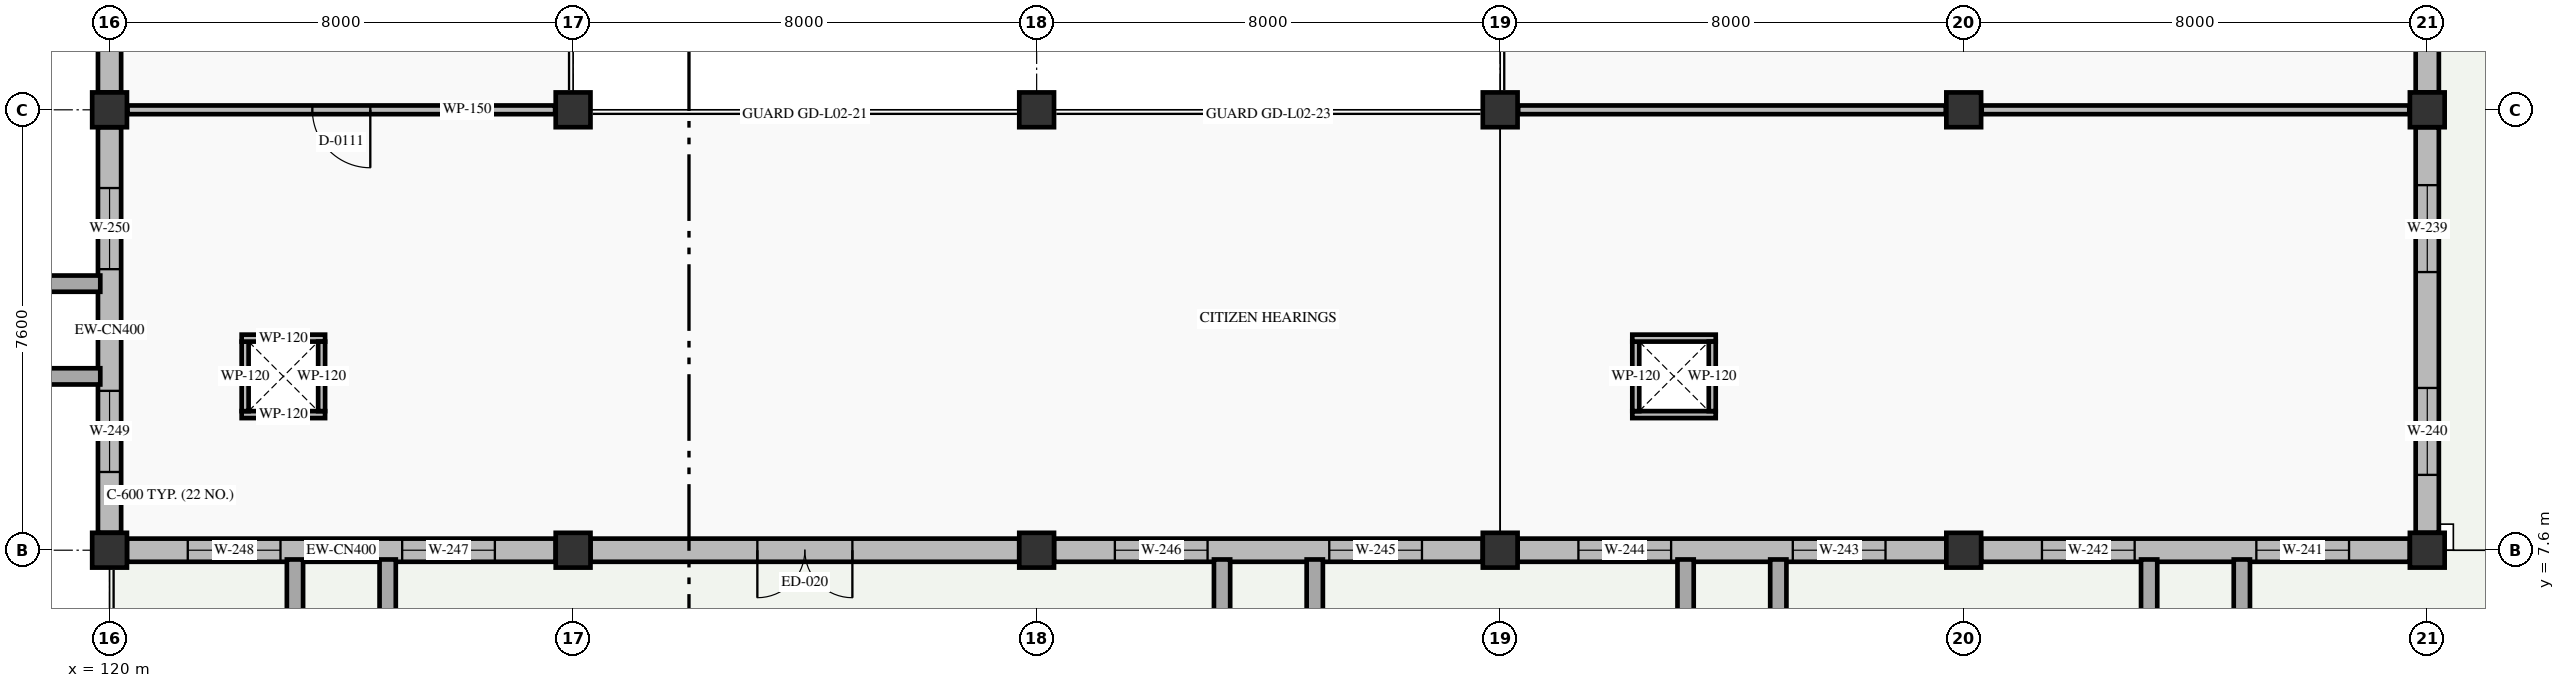
"""IFC4 building model, lengths in metres.
Left out: names, types, materials, properties, quantities, classifications, styles, units other than length and angle.
Written with IfcOpenShell. Run it as: python <this file> out.ifc"""

import sys

from ifc_helpers import new_model, si_unit, direction, frame, frame_2d, origin, origin_2d, place, context, subcontext, project, spatial, rectangle, extrude, element, fill, save


model = new_model("IFC4")
c1 = context("Model", 3, precision=1e-05, world=origin(), true_north=direction((0.0, 1.0)))
c2 = subcontext(c1, "Body", "Model", "MODEL_VIEW")
j1 = project(units=[si_unit("LENGTHUNIT", "METRE"), si_unit("PLANEANGLEUNIT", "RADIAN")], contexts=[c1])
p1 = place(None, origin())
s1 = spatial("IfcSite", under=j1, at=p1, CompositionType="ELEMENT")
p2 = place(p1, origin())
s2 = spatial("IfcBuilding", under=s1, at=p2, CompositionType="ELEMENT")
p3 = place(p2, frame((0.0, 0.0, 5.4)))
s3 = spatial("IfcBuildingStorey", under=s2, at=p3, CompositionType="ELEMENT", Elevation=5.4)
for number, where, z_axis, x_axis in (
    (1, (120.0, 7.6, 0.0), (0.0, 0.0, 1.0), (1.0, 0.0, 0.0)),
    (2, (120.0, 15.2, 0.0), (0.0, 0.0, 1.0), (1.0, 0.0, 0.0)),
    (3, (128.0, 7.6, 0.0), (0.0, 0.0, 1.0), (1.0, 0.0, 0.0)),
    (4, (128.0, 15.2, 0.0), (0.0, 0.0, 1.0), (1.0, 0.0, 0.0)),
    (5, (136.0, 7.6, 0.0), (0.0, 0.0, 1.0), (1.0, 0.0, 0.0)),
    (6, (136.0, 15.2, 0.0), (0.0, 0.0, 1.0), (1.0, 0.0, 0.0)),
    (7, (144.0, 7.6, 0.0), (0.0, 0.0, 1.0), (1.0, 0.0, 0.0)),
    (8, (144.0, 15.2, 0.0), (0.0, 0.0, 1.0), (1.0, 0.0, 0.0)),
    (9, (152.0, 7.6, 0.0), (0.0, 0.0, 1.0), (1.0, 0.0, 0.0)),
    (10, (152.0, 15.2, 0.0), (0.0, 0.0, 1.0), (1.0, 0.0, 0.0)),
    (11, (160.0, 7.6, 0.0), (0.0, 0.0, 1.0), (1.0, 0.0, 0.0)),
    (12, (160.0, 15.2, 0.0), (0.0, 0.0, 1.0), (1.0, 0.0, 0.0)),
):
    element("IfcColumn", number, at=place(p3, frame(where, z_axis=z_axis, x_axis=x_axis)), inside=s3, PredefinedType="COLUMN", context=c2, shape_type="SweptSolid", body=[
        extrude(rectangle(XDim=0.6, YDim=0.6, at=origin_2d()), origin(), (0.0, 0.0, 1.0), 4.8),
    ])
p4 = place(p3, frame((160.0, 18.7, 0.0), z_axis=(0.0, 0.0, 1.0), x_axis=(0.0, -1.0, 0.0)))
e13 = element("IfcWall", 13, at=p4, inside=s3, PredefinedType="STANDARD", context=c2, shape_type="SweptSolid", body=[
    extrude(rectangle(XDim=3.2, YDim=0.4, at=frame_2d((1.6, 0.0))), origin(), (0.0, 0.0, 1.0), 3.85),
])
p5 = place(p4, frame((0.85, 0.0, 0.9)))
e14 = element("IfcOpeningElement", 14, at=p5, cuts=e13, PredefinedType="OPENING", context=c2, shape_type="SweptSolid", body=[
    extrude(rectangle(XDim=1.5, YDim=2.15, at=frame_2d((0.75, 1.075))), frame((0.0, 0.21, 0.0), z_axis=(0.0, -1.0, 0.0), x_axis=(1.0, 0.0, 0.0)), (0.0, 0.0, 1.0), 0.42),
])
p6 = place(p3, frame((160.0, 14.9, 0.0), z_axis=(0.0, 0.0, 1.0), x_axis=(0.0, -1.0, 0.0)))
e15 = element("IfcWall", 15, at=p6, inside=s3, PredefinedType="STANDARD", context=c2, shape_type="SweptSolid", body=[
    extrude(rectangle(XDim=7.0, YDim=0.4, at=frame_2d((3.5, 0.0))), origin(), (0.0, 0.0, 1.0), 3.85),
])
p7 = place(p6, frame((1.0, 0.0, 0.9)))
e16 = element("IfcOpeningElement", 16, at=p7, cuts=e15, PredefinedType="OPENING", context=c2, shape_type="SweptSolid", body=[
    extrude(rectangle(XDim=1.5, YDim=2.15, at=frame_2d((0.75, 1.075))), frame((0.0, 0.21, 0.0), z_axis=(0.0, -1.0, 0.0), x_axis=(1.0, 0.0, 0.0)), (0.0, 0.0, 1.0), 0.42),
])
p8 = place(p6, frame((4.5, 0.0, 0.9)))
e17 = element("IfcOpeningElement", 17, at=p8, cuts=e15, PredefinedType="OPENING", context=c2, shape_type="SweptSolid", body=[
    extrude(rectangle(XDim=1.5, YDim=2.15, at=frame_2d((0.75, 1.075))), frame((0.0, 0.21, 0.0), z_axis=(0.0, -1.0, 0.0), x_axis=(1.0, 0.0, 0.0)), (0.0, 0.0, 1.0), 0.42),
])
p9 = place(p3, frame((159.7, 7.6, 0.0), z_axis=(0.0, 0.0, 1.0), x_axis=(-1.0, 0.0, 0.0)))
e18 = element("IfcWall", 18, at=p9, inside=s3, PredefinedType="STANDARD", context=c2, shape_type="SweptSolid", body=[
    extrude(rectangle(XDim=7.4, YDim=0.4, at=frame_2d((3.7, 0.0))), origin(), (0.0, 0.0, 1.0), 3.85),
])
p10 = place(p9, frame((1.05, 0.0, 0.9)))
e19 = element("IfcOpeningElement", 19, at=p10, cuts=e18, PredefinedType="OPENING", context=c2, shape_type="SweptSolid", body=[
    extrude(rectangle(XDim=1.6, YDim=2.25, at=frame_2d((0.8, 1.125))), frame((0.0, 0.21, 0.0), z_axis=(0.0, -1.0, 0.0), x_axis=(1.0, 0.0, 0.0)), (0.0, 0.0, 1.0), 0.42),
])
p11 = place(p9, frame((4.75, 0.0, 0.9)))
e20 = element("IfcOpeningElement", 20, at=p11, cuts=e18, PredefinedType="OPENING", context=c2, shape_type="SweptSolid", body=[
    extrude(rectangle(XDim=1.6, YDim=2.25, at=frame_2d((0.8, 1.125))), frame((0.0, 0.21, 0.0), z_axis=(0.0, -1.0, 0.0), x_axis=(1.0, 0.0, 0.0)), (0.0, 0.0, 1.0), 0.42),
])
p12 = place(p3, frame((151.7, 7.6, 0.0), z_axis=(0.0, 0.0, 1.0), x_axis=(-1.0, 0.0, 0.0)))
e21 = element("IfcWall", 21, at=p12, inside=s3, PredefinedType="STANDARD", context=c2, shape_type="SweptSolid", body=[
    extrude(rectangle(XDim=7.4, YDim=0.4, at=frame_2d((3.7, 0.0))), origin(), (0.0, 0.0, 1.0), 3.85),
])
p13 = place(p12, frame((1.05, 0.0, 0.9)))
e22 = element("IfcOpeningElement", 22, at=p13, cuts=e21, PredefinedType="OPENING", context=c2, shape_type="SweptSolid", body=[
    extrude(rectangle(XDim=1.6, YDim=2.25, at=frame_2d((0.8, 1.125))), frame((0.0, 0.21, 0.0), z_axis=(0.0, -1.0, 0.0), x_axis=(1.0, 0.0, 0.0)), (0.0, 0.0, 1.0), 0.42),
])
p14 = place(p12, frame((4.75, 0.0, 0.9)))
e23 = element("IfcOpeningElement", 23, at=p14, cuts=e21, PredefinedType="OPENING", context=c2, shape_type="SweptSolid", body=[
    extrude(rectangle(XDim=1.6, YDim=2.25, at=frame_2d((0.8, 1.125))), frame((0.0, 0.21, 0.0), z_axis=(0.0, -1.0, 0.0), x_axis=(1.0, 0.0, 0.0)), (0.0, 0.0, 1.0), 0.42),
])
p15 = place(p3, frame((143.7, 7.6, 0.0), z_axis=(0.0, 0.0, 1.0), x_axis=(-1.0, 0.0, 0.0)))
e24 = element("IfcWall", 24, at=p15, inside=s3, PredefinedType="STANDARD", context=c2, shape_type="SweptSolid", body=[
    extrude(rectangle(XDim=7.4, YDim=0.4, at=frame_2d((3.7, 0.0))), origin(), (0.0, 0.0, 1.0), 3.85),
])
p16 = place(p15, frame((1.05, 0.0, 0.9)))
e25 = element("IfcOpeningElement", 25, at=p16, cuts=e24, PredefinedType="OPENING", context=c2, shape_type="SweptSolid", body=[
    extrude(rectangle(XDim=1.6, YDim=2.25, at=frame_2d((0.8, 1.125))), frame((0.0, 0.21, 0.0), z_axis=(0.0, -1.0, 0.0), x_axis=(1.0, 0.0, 0.0)), (0.0, 0.0, 1.0), 0.42),
])
p17 = place(p15, frame((4.75, 0.0, 0.9)))
e26 = element("IfcOpeningElement", 26, at=p17, cuts=e24, PredefinedType="OPENING", context=c2, shape_type="SweptSolid", body=[
    extrude(rectangle(XDim=1.6, YDim=2.25, at=frame_2d((0.8, 1.125))), frame((0.0, 0.21, 0.0), z_axis=(0.0, -1.0, 0.0), x_axis=(1.0, 0.0, 0.0)), (0.0, 0.0, 1.0), 0.42),
])
p18 = place(p3, frame((135.7, 7.6, 0.0), z_axis=(0.0, 0.0, 1.0), x_axis=(-1.0, 0.0, 0.0)))
e27 = element("IfcWall", 27, at=p18, inside=s3, PredefinedType="STANDARD", context=c2, shape_type="SweptSolid", body=[
    extrude(rectangle(XDim=7.4, YDim=0.4, at=frame_2d((3.7, 0.0))), origin(), (0.0, 0.0, 1.0), 3.85),
])
p19 = place(p18, frame((2.88, 0.0, 0.0)))
e28 = element("IfcOpeningElement", 28, at=p19, cuts=e27, PredefinedType="OPENING", context=c2, shape_type="SweptSolid", body=[
    extrude(rectangle(XDim=1.64, YDim=2.28, at=frame_2d((0.82, 1.14))), frame((0.0, 0.21, 0.0), z_axis=(0.0, -1.0, 0.0), x_axis=(1.0, 0.0, 0.0)), (0.0, 0.0, 1.0), 0.42),
])
p20 = place(p3, frame((127.7, 7.6, 0.0), z_axis=(0.0, 0.0, 1.0), x_axis=(-1.0, 0.0, 0.0)))
e29 = element("IfcWall", 29, at=p20, inside=s3, PredefinedType="STANDARD", context=c2, shape_type="SweptSolid", body=[
    extrude(rectangle(XDim=7.4, YDim=0.4, at=frame_2d((3.7, 0.0))), origin(), (0.0, 0.0, 1.0), 3.85),
])
p21 = place(p20, frame((1.05, 0.0, 0.9)))
e30 = element("IfcOpeningElement", 30, at=p21, cuts=e29, PredefinedType="OPENING", context=c2, shape_type="SweptSolid", body=[
    extrude(rectangle(XDim=1.6, YDim=2.25, at=frame_2d((0.8, 1.125))), frame((0.0, 0.21, 0.0), z_axis=(0.0, -1.0, 0.0), x_axis=(1.0, 0.0, 0.0)), (0.0, 0.0, 1.0), 0.42),
])
p22 = place(p20, frame((4.75, 0.0, 0.9)))
e31 = element("IfcOpeningElement", 31, at=p22, cuts=e29, PredefinedType="OPENING", context=c2, shape_type="SweptSolid", body=[
    extrude(rectangle(XDim=1.6, YDim=2.25, at=frame_2d((0.8, 1.125))), frame((0.0, 0.21, 0.0), z_axis=(0.0, -1.0, 0.0), x_axis=(1.0, 0.0, 0.0)), (0.0, 0.0, 1.0), 0.42),
])
p23 = place(p3, frame((120.0, 7.9, 0.0), z_axis=(0.0, 0.0, 1.0), x_axis=(0.0, 1.0, 0.0)))
e32 = element("IfcWall", 32, at=p23, inside=s3, PredefinedType="STANDARD", context=c2, shape_type="SweptSolid", body=[
    extrude(rectangle(XDim=7.0, YDim=0.4, at=frame_2d((3.5, 0.0))), origin(), (0.0, 0.0, 1.0), 3.87),
])
p24 = place(p23, frame((1.05, 0.0, 0.9)))
e33 = element("IfcOpeningElement", 33, at=p24, cuts=e32, PredefinedType="OPENING", context=c2, shape_type="SweptSolid", body=[
    extrude(rectangle(XDim=1.4, YDim=2.05, at=frame_2d((0.7, 1.025))), frame((0.0, 0.21, 0.0), z_axis=(0.0, -1.0, 0.0), x_axis=(1.0, 0.0, 0.0)), (0.0, 0.0, 1.0), 0.42),
])
p25 = place(p23, frame((4.55, 0.0, 0.9)))
e34 = element("IfcOpeningElement", 34, at=p25, cuts=e32, PredefinedType="OPENING", context=c2, shape_type="SweptSolid", body=[
    extrude(rectangle(XDim=1.4, YDim=2.05, at=frame_2d((0.7, 1.025))), frame((0.0, 0.21, 0.0), z_axis=(0.0, -1.0, 0.0), x_axis=(1.0, 0.0, 0.0)), (0.0, 0.0, 1.0), 0.42),
])
p26 = place(p3, frame((120.0, 15.5, 0.0), z_axis=(0.0, 0.0, 1.0), x_axis=(0.0, 1.0, 0.0)))
e35 = element("IfcWall", 35, at=p26, inside=s3, PredefinedType="STANDARD", context=c2, shape_type="SweptSolid", body=[
    extrude(rectangle(XDim=7.0, YDim=0.4, at=frame_2d((3.5, 0.0))), origin(), (0.0, 0.0, 1.0), 3.87),
])
p27 = place(p26, frame((1.05, 0.0, 0.9)))
e36 = element("IfcOpeningElement", 36, at=p27, cuts=e35, PredefinedType="OPENING", context=c2, shape_type="SweptSolid", body=[
    extrude(rectangle(XDim=1.4, YDim=2.05, at=frame_2d((0.7, 1.025))), frame((0.0, 0.21, 0.0), z_axis=(0.0, -1.0, 0.0), x_axis=(1.0, 0.0, 0.0)), (0.0, 0.0, 1.0), 0.42),
])
p28 = place(p26, frame((4.55, 0.0, 0.9)))
e37 = element("IfcOpeningElement", 37, at=p28, cuts=e35, PredefinedType="OPENING", context=c2, shape_type="SweptSolid", body=[
    extrude(rectangle(XDim=1.4, YDim=2.05, at=frame_2d((0.7, 1.025))), frame((0.0, 0.21, 0.0), z_axis=(0.0, -1.0, 0.0), x_axis=(1.0, 0.0, 0.0)), (0.0, 0.0, 1.0), 0.42),
])
p29 = place(p3, frame((123.72, 9.94, 0.0), z_axis=(0.0, 0.0, 1.0), x_axis=(-1.0, 0.0, 0.0)))
e38 = element("IfcWall", 38, at=p29, inside=s3, PredefinedType="PARTITIONING", context=c2, shape_type="SweptSolid", body=[
    extrude(rectangle(XDim=1.44, YDim=0.12, at=frame_2d((0.72, 0.0))), origin(), (0.0, 0.0, 1.0), 4.45),
])
p30 = place(p3, frame((122.34, 10.0, 0.0), z_axis=(0.0, 0.0, 1.0), x_axis=(0.0, 1.0, 0.0)))
e39 = element("IfcWall", 39, at=p30, inside=s3, PredefinedType="PARTITIONING", context=c2, shape_type="SweptSolid", body=[
    extrude(rectangle(XDim=1.2, YDim=0.12, at=frame_2d((0.6, 0.0))), origin(), (0.0, 0.0, 1.0), 4.45),
])
p31 = place(p3, frame((122.28, 11.26, 0.0), z_axis=(0.0, 0.0, 1.0), x_axis=(1.0, 0.0, 0.0)))
e40 = element("IfcWall", 40, at=p31, inside=s3, PredefinedType="PARTITIONING", context=c2, shape_type="SweptSolid", body=[
    extrude(rectangle(XDim=1.44, YDim=0.12, at=frame_2d((0.72, 0.0))), origin(), (0.0, 0.0, 1.0), 4.45),
])
p32 = place(p3, frame((123.66, 11.2, 0.0), z_axis=(0.0, 0.0, 1.0), x_axis=(0.0, -1.0, 0.0)))
e41 = element("IfcWall", 41, at=p32, inside=s3, PredefinedType="PARTITIONING", context=c2, shape_type="SweptSolid", body=[
    extrude(rectangle(XDim=1.2, YDim=0.12, at=frame_2d((0.6, 0.0))), origin(), (0.0, 0.0, 1.0), 4.45),
])
p33 = place(p3, frame((147.72, 9.94, 0.0), z_axis=(0.0, 0.0, 1.0), x_axis=(-1.0, 0.0, 0.0)))
e42 = element("IfcWall", 42, at=p33, inside=s3, PredefinedType="PARTITIONING", context=c2, shape_type="SweptSolid", body=[
    extrude(rectangle(XDim=1.44, YDim=0.12, at=frame_2d((0.72, 0.0))), origin(), (0.0, 0.0, 1.0), 4.45),
])
p34 = place(p3, frame((146.34, 10.0, 0.0), z_axis=(0.0, 0.0, 1.0), x_axis=(0.0, 1.0, 0.0)))
e43 = element("IfcWall", 43, at=p34, inside=s3, PredefinedType="PARTITIONING", context=c2, shape_type="SweptSolid", body=[
    extrude(rectangle(XDim=1.2, YDim=0.12, at=frame_2d((0.6, 0.0))), origin(), (0.0, 0.0, 1.0), 4.45),
])
p35 = place(p3, frame((146.28, 11.26, 0.0), z_axis=(0.0, 0.0, 1.0), x_axis=(1.0, 0.0, 0.0)))
e44 = element("IfcWall", 44, at=p35, inside=s3, PredefinedType="PARTITIONING", context=c2, shape_type="SweptSolid", body=[
    extrude(rectangle(XDim=1.44, YDim=0.12, at=frame_2d((0.72, 0.0))), origin(), (0.0, 0.0, 1.0), 4.45),
])
p36 = place(p3, frame((147.66, 11.2, 0.0), z_axis=(0.0, 0.0, 1.0), x_axis=(0.0, -1.0, 0.0)))
e45 = element("IfcWall", 45, at=p36, inside=s3, PredefinedType="PARTITIONING", context=c2, shape_type="SweptSolid", body=[
    extrude(rectangle(XDim=1.2, YDim=0.12, at=frame_2d((0.6, 0.0))), origin(), (0.0, 0.0, 1.0), 4.45),
])
p37 = place(p3, frame((127.69, 15.2, 0.0), z_axis=(0.0, 0.0, 1.0), x_axis=(-1.0, 0.0, 0.0)))
e46 = element("IfcWall", 46, at=p37, inside=s3, PredefinedType="PARTITIONING", context=c2, shape_type="SweptSolid", body=[
    extrude(rectangle(XDim=7.38, YDim=0.15, at=frame_2d((3.69, 0.0))), origin(), (0.0, 0.0, 1.0), 3.8),
])
p38 = place(p37, frame((3.19, 0.0, 0.0)))
e47 = element("IfcOpeningElement", 47, at=p38, cuts=e46, PredefinedType="OPENING", context=c2, shape_type="SweptSolid", body=[
    extrude(rectangle(XDim=1.0, YDim=2.15, at=frame_2d((0.5, 1.075))), frame((0.0, 0.085, 0.0), z_axis=(0.0, -1.0, 0.0), x_axis=(1.0, 0.0, 0.0)), (0.0, 0.0, 1.0), 0.17),
])
for number, where, z_axis, x_axis in (
    (48, (159.69, 15.2, 0.0), (0.0, 0.0, 1.0), (-1.0, 0.0, 0.0)),
    (49, (151.69, 15.2, 0.0), (0.0, 0.0, 1.0), (-1.0, 0.0, 0.0)),
):
    element("IfcWall", number, at=place(p3, frame(where, z_axis=z_axis, x_axis=x_axis)), inside=s3, PredefinedType="PARTITIONING", context=c2, shape_type="SweptSolid", body=[
        extrude(rectangle(XDim=7.38, YDim=0.15, at=frame_2d((3.69, 0.0))), origin(), (0.0, 0.0, 1.0), 3.8),
    ])
p39 = place(p7, origin())
e50 = element("IfcWindow", 50, at=p39, inside=s3, PartitioningType="DOUBLE_PANEL_VERTICAL", PredefinedType="WINDOW", context=c2, shape_type="SweptSolid", body=[
    extrude(rectangle(XDim=1.5, YDim=2.15, at=frame_2d((0.75, 1.075))), frame((0.0, 0.03, 0.0), z_axis=(0.0, -1.0, 0.0), x_axis=(1.0, 0.0, 0.0)), (0.0, 0.0, 1.0), 0.06),
])
fill(e16, e50)
p40 = place(p8, origin())
e51 = element("IfcWindow", 51, at=p40, inside=s3, PartitioningType="DOUBLE_PANEL_VERTICAL", PredefinedType="WINDOW", context=c2, shape_type="SweptSolid", body=[
    extrude(rectangle(XDim=1.5, YDim=2.15, at=frame_2d((0.75, 1.075))), frame((0.0, 0.03, 0.0), z_axis=(0.0, -1.0, 0.0), x_axis=(1.0, 0.0, 0.0)), (0.0, 0.0, 1.0), 0.06),
])
fill(e17, e51)
p41 = place(p10, origin())
e52 = element("IfcWindow", 52, at=p41, inside=s3, PartitioningType="DOUBLE_PANEL_VERTICAL", PredefinedType="WINDOW", context=c2, shape_type="SweptSolid", body=[
    extrude(rectangle(XDim=1.6, YDim=2.25, at=frame_2d((0.8, 1.125))), frame((0.0, 0.03, 0.0), z_axis=(0.0, -1.0, 0.0), x_axis=(1.0, 0.0, 0.0)), (0.0, 0.0, 1.0), 0.06),
])
fill(e19, e52)
p42 = place(p11, origin())
e53 = element("IfcWindow", 53, at=p42, inside=s3, PartitioningType="DOUBLE_PANEL_VERTICAL", PredefinedType="WINDOW", context=c2, shape_type="SweptSolid", body=[
    extrude(rectangle(XDim=1.6, YDim=2.25, at=frame_2d((0.8, 1.125))), frame((0.0, 0.03, 0.0), z_axis=(0.0, -1.0, 0.0), x_axis=(1.0, 0.0, 0.0)), (0.0, 0.0, 1.0), 0.06),
])
fill(e20, e53)
p43 = place(p13, origin())
e54 = element("IfcWindow", 54, at=p43, inside=s3, PartitioningType="DOUBLE_PANEL_VERTICAL", PredefinedType="WINDOW", context=c2, shape_type="SweptSolid", body=[
    extrude(rectangle(XDim=1.6, YDim=2.25, at=frame_2d((0.8, 1.125))), frame((0.0, 0.03, 0.0), z_axis=(0.0, -1.0, 0.0), x_axis=(1.0, 0.0, 0.0)), (0.0, 0.0, 1.0), 0.06),
])
fill(e22, e54)
p44 = place(p14, origin())
e55 = element("IfcWindow", 55, at=p44, inside=s3, PartitioningType="DOUBLE_PANEL_VERTICAL", PredefinedType="WINDOW", context=c2, shape_type="SweptSolid", body=[
    extrude(rectangle(XDim=1.6, YDim=2.25, at=frame_2d((0.8, 1.125))), frame((0.0, 0.03, 0.0), z_axis=(0.0, -1.0, 0.0), x_axis=(1.0, 0.0, 0.0)), (0.0, 0.0, 1.0), 0.06),
])
fill(e23, e55)
p45 = place(p16, origin())
e56 = element("IfcWindow", 56, at=p45, inside=s3, PartitioningType="DOUBLE_PANEL_VERTICAL", PredefinedType="WINDOW", context=c2, shape_type="SweptSolid", body=[
    extrude(rectangle(XDim=1.6, YDim=2.25, at=frame_2d((0.8, 1.125))), frame((0.0, 0.03, 0.0), z_axis=(0.0, -1.0, 0.0), x_axis=(1.0, 0.0, 0.0)), (0.0, 0.0, 1.0), 0.06),
])
fill(e25, e56)
p46 = place(p17, origin())
e57 = element("IfcWindow", 57, at=p46, inside=s3, PartitioningType="DOUBLE_PANEL_VERTICAL", PredefinedType="WINDOW", context=c2, shape_type="SweptSolid", body=[
    extrude(rectangle(XDim=1.6, YDim=2.25, at=frame_2d((0.8, 1.125))), frame((0.0, 0.03, 0.0), z_axis=(0.0, -1.0, 0.0), x_axis=(1.0, 0.0, 0.0)), (0.0, 0.0, 1.0), 0.06),
])
fill(e26, e57)
p47 = place(p19, origin())
e58 = element("IfcDoor", 58, at=p47, inside=s3, OperationType="DOUBLE_DOOR_SINGLE_SWING", PredefinedType="DOOR", context=c2, shape_type="SweptSolid", body=[
    extrude(rectangle(XDim=1.64, YDim=2.28, at=frame_2d((0.82, 1.14))), frame((0.0, 0.025, 0.0), z_axis=(0.0, -1.0, 0.0), x_axis=(1.0, 0.0, 0.0)), (0.0, 0.0, 1.0), 0.05),
])
fill(e28, e58)
p48 = place(p21, origin())
e59 = element("IfcWindow", 59, at=p48, inside=s3, PartitioningType="DOUBLE_PANEL_VERTICAL", PredefinedType="WINDOW", context=c2, shape_type="SweptSolid", body=[
    extrude(rectangle(XDim=1.6, YDim=2.25, at=frame_2d((0.8, 1.125))), frame((0.0, 0.03, 0.0), z_axis=(0.0, -1.0, 0.0), x_axis=(1.0, 0.0, 0.0)), (0.0, 0.0, 1.0), 0.06),
])
fill(e30, e59)
p49 = place(p22, origin())
e60 = element("IfcWindow", 60, at=p49, inside=s3, PartitioningType="DOUBLE_PANEL_VERTICAL", PredefinedType="WINDOW", context=c2, shape_type="SweptSolid", body=[
    extrude(rectangle(XDim=1.6, YDim=2.25, at=frame_2d((0.8, 1.125))), frame((0.0, 0.03, 0.0), z_axis=(0.0, -1.0, 0.0), x_axis=(1.0, 0.0, 0.0)), (0.0, 0.0, 1.0), 0.06),
])
fill(e31, e60)
p50 = place(p24, origin())
e61 = element("IfcWindow", 61, at=p50, inside=s3, PartitioningType="DOUBLE_PANEL_VERTICAL", PredefinedType="WINDOW", context=c2, shape_type="SweptSolid", body=[
    extrude(rectangle(XDim=1.4, YDim=2.05, at=frame_2d((0.7, 1.025))), frame((0.0, 0.03, 0.0), z_axis=(0.0, -1.0, 0.0), x_axis=(1.0, 0.0, 0.0)), (0.0, 0.0, 1.0), 0.06),
])
fill(e33, e61)
p51 = place(p25, origin())
e62 = element("IfcWindow", 62, at=p51, inside=s3, PartitioningType="DOUBLE_PANEL_VERTICAL", PredefinedType="WINDOW", context=c2, shape_type="SweptSolid", body=[
    extrude(rectangle(XDim=1.4, YDim=2.05, at=frame_2d((0.7, 1.025))), frame((0.0, 0.03, 0.0), z_axis=(0.0, -1.0, 0.0), x_axis=(1.0, 0.0, 0.0)), (0.0, 0.0, 1.0), 0.06),
])
fill(e34, e62)
p52 = place(p38, origin())
e63 = element("IfcDoor", 63, at=p52, inside=s3, OperationType="SINGLE_SWING_LEFT", PredefinedType="DOOR", context=c2, shape_type="SweptSolid", body=[
    extrude(rectangle(XDim=1.0, YDim=2.15, at=frame_2d((0.5, 1.075))), frame((0.0, 0.025, 0.0), z_axis=(0.0, -1.0, 0.0), x_axis=(1.0, 0.0, 0.0)), (0.0, 0.0, 1.0), 0.05),
])
fill(e47, e63)
save(model, sys.argv[1])
